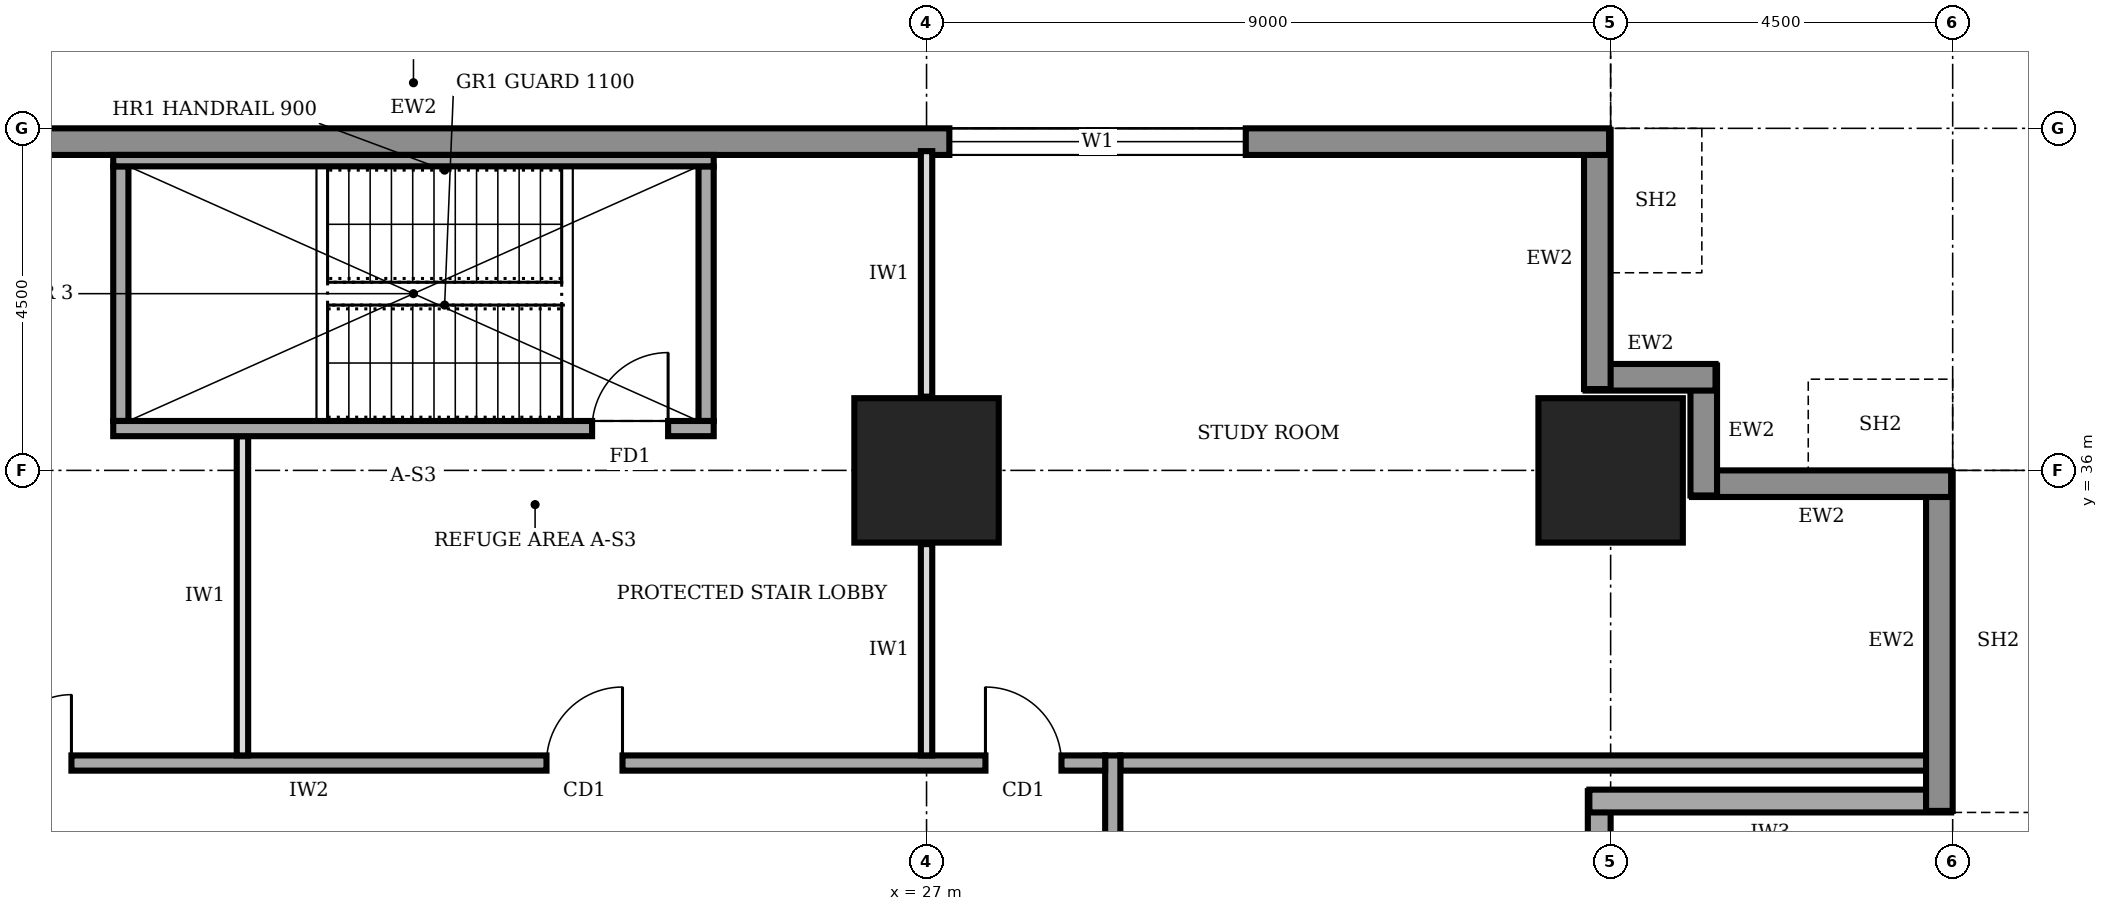
"""IFC4 building model, lengths in metres.
Left out: names, types, materials, properties, quantities, classifications, styles, units other than length and angle.
Written with IfcOpenShell. Run it as: python <this file> out.ifc"""

import sys

from ifc_helpers import new_model, si_unit, direction, frame, frame_2d, origin, origin_2d, place, context, subcontext, project, spatial, rectangle, extrude, element, fill, save


model = new_model("IFC4")
c1 = context("Model", 3, precision=1e-05, world=origin(), true_north=direction((0.0, 1.0)))
c2 = subcontext(c1, "Body", "Model", "MODEL_VIEW")
j1 = project(units=[si_unit("LENGTHUNIT", "METRE"), si_unit("PLANEANGLEUNIT", "RADIAN")], contexts=[c1])
p1 = place(None, origin())
s1 = spatial("IfcSite", under=j1, at=p1, CompositionType="ELEMENT")
p2 = place(p1, origin())
s2 = spatial("IfcBuilding", under=s1, at=p2, CompositionType="ELEMENT")
p3 = place(p2, frame((0.0, 0.0, 125.0)))
s3 = spatial("IfcBuildingStorey", under=s2, at=p3, CompositionType="ELEMENT", Elevation=125.0)
for number, where, z_axis, x_axis in (
    (1, (27.0, 36.0, 0.0), (0.0, 0.0, 1.0), (1.0, 0.0, 0.0)),
    (2, (36.0, 36.0, 0.0), (0.0, 0.0, 1.0), (1.0, 0.0, 0.0)),
):
    element("IfcColumn", number, at=place(p3, frame(where, z_axis=z_axis, x_axis=x_axis)), inside=s3, PredefinedType="COLUMN", context=c2, shape_type="SweptSolid", body=[
        extrude(rectangle(XDim=1.9, YDim=1.9, at=origin_2d()), origin(), (0.0, 0.0, 1.0), 4.0),
    ])
p4 = place(p3, frame((35.85, 30.4, 0.0), z_axis=(0.0, 0.0, 1.0), x_axis=(0.0, 1.0, 0.0)))
e3 = element("IfcWall", 3, at=p4, inside=s3, PredefinedType="SOLIDWALL", context=c2, shape_type="SweptSolid", body=[
    extrude(rectangle(XDim=1.38, YDim=0.3, at=frame_2d((0.69, 0.0))), origin(), (0.0, 0.0, 1.0), 2.65),
])
p5 = place(p3, frame((35.72, 31.65, 0.0), z_axis=(0.0, 0.0, 1.0), x_axis=(1.0, 0.0, 0.0)))
e4 = element("IfcWall", 4, at=p5, inside=s3, PredefinedType="SOLIDWALL", context=c2, shape_type="SweptSolid", body=[
    extrude(rectangle(XDim=4.76, YDim=0.3, at=frame_2d((2.38, 0.0))), origin(), (0.0, 0.0, 1.0), 3.75),
])
p6 = place(p3, frame((40.325, 31.52, 0.0), z_axis=(0.0, 0.0, 1.0), x_axis=(0.0, 1.0, 0.0)))
e5 = element("IfcWall", 5, at=p6, inside=s3, PredefinedType="STANDARD", context=c2, shape_type="SweptSolid", body=[
    extrude(rectangle(XDim=4.46, YDim=0.35, at=frame_2d((2.23, 0.0))), origin(), (0.0, 0.0, 1.0), 3.75),
])
p7 = place(p3, frame((40.48, 35.825, 0.0), z_axis=(0.0, 0.0, 1.0), x_axis=(-1.0, 0.0, 0.0)))
e6 = element("IfcWall", 6, at=p7, inside=s3, PredefinedType="STANDARD", context=c2, shape_type="SweptSolid", body=[
    extrude(rectangle(XDim=3.41, YDim=0.35, at=frame_2d((1.705, 0.0))), origin(), (0.0, 0.0, 1.0), 2.85),
])
for number, where, z_axis, x_axis in (
    (7, (37.225, 35.67, 0.0), (0.0, 0.0, 1.0), (0.0, 1.0, 0.0)),
    (8, (37.38, 37.225, 0.0), (0.0, 0.0, 1.0), (-1.0, 0.0, 0.0)),
):
    element("IfcWall", number, at=place(p3, frame(where, z_axis=z_axis, x_axis=x_axis)), inside=s3, PredefinedType="STANDARD", context=c2, shape_type="SweptSolid", body=[
        extrude(rectangle(XDim=1.71, YDim=0.35, at=frame_2d((0.855, 0.0))), origin(), (0.0, 0.0, 1.0), 3.75),
    ])
p8 = place(p3, frame((35.825, 37.07, 0.0), z_axis=(0.0, 0.0, 1.0), x_axis=(0.0, 1.0, 0.0)))
e9 = element("IfcWall", 9, at=p8, inside=s3, PredefinedType="STANDARD", context=c2, shape_type="SweptSolid", body=[
    extrude(rectangle(XDim=3.41, YDim=0.35, at=frame_2d((1.705, 0.0))), origin(), (0.0, 0.0, 1.0), 2.85),
])
p9 = place(p3, frame((35.98, 40.325, 0.0), z_axis=(0.0, 0.0, 1.0), x_axis=(-1.0, 0.0, 0.0)))
e10 = element("IfcWall", 10, at=p9, inside=s3, PredefinedType="STANDARD", context=c2, shape_type="SweptSolid", body=[
    extrude(rectangle(XDim=31.46, YDim=0.35, at=frame_2d((15.73, 0.0))), origin(), (0.0, 0.0, 1.0), 3.75),
])
p10 = place(p9, frame((27.21, 0.0, 0.9)))
e11 = element("IfcOpeningElement", 11, at=p10, cuts=e10, PredefinedType="OPENING", context=c2, shape_type="SweptSolid", body=[
    extrude(rectangle(XDim=3.9, YDim=2.2, at=frame_2d((1.95, 1.1))), frame((0.0, 0.185, 0.0), z_axis=(0.0, -1.0, 0.0), x_axis=(1.0, 0.0, 0.0)), (0.0, 0.0, 1.0), 0.37),
])
p11 = place(p9, frame((22.78, 0.0, 0.9)))
e12 = element("IfcOpeningElement", 12, at=p11, cuts=e10, PredefinedType="OPENING", context=c2, shape_type="SweptSolid", body=[
    extrude(rectangle(XDim=3.9, YDim=2.2, at=frame_2d((1.95, 1.1))), frame((0.0, 0.185, 0.0), z_axis=(0.0, -1.0, 0.0), x_axis=(1.0, 0.0, 0.0)), (0.0, 0.0, 1.0), 0.37),
])
p12 = place(p9, frame((4.78, 0.0, 0.9)))
e13 = element("IfcOpeningElement", 13, at=p12, cuts=e10, PredefinedType="OPENING", context=c2, shape_type="SweptSolid", body=[
    extrude(rectangle(XDim=3.9, YDim=2.2, at=frame_2d((1.95, 1.1))), frame((0.0, 0.185, 0.0), z_axis=(0.0, -1.0, 0.0), x_axis=(1.0, 0.0, 0.0)), (0.0, 0.0, 1.0), 0.37),
])
p13 = place(p3, frame((29.45, 9.2, 0.0), z_axis=(0.0, 0.0, 1.0), x_axis=(0.0, 1.0, 0.0)))
e14 = element("IfcWall", 14, at=p13, inside=s3, PredefinedType="SOLIDWALL", context=c2, shape_type="SweptSolid", body=[
    extrude(rectangle(XDim=23.05, YDim=0.2, at=frame_2d((11.525, 0.0))), origin(), (0.0, 0.0, 1.0), 3.75),
])
p14 = place(p13, frame((10.525, 0.0, 0.0)))
e15 = element("IfcOpeningElement", 15, at=p14, cuts=e14, PredefinedType="OPENING", context=c2, shape_type="SweptSolid", body=[
    extrude(rectangle(XDim=1.8, YDim=2.1, at=frame_2d((0.9, 1.05))), frame((0.0, 0.11, 0.0), z_axis=(0.0, -1.0, 0.0), x_axis=(1.0, 0.0, 0.0)), (0.0, 0.0, 1.0), 0.22),
])
p15 = place(p3, frame((29.35, 32.15, 0.0), z_axis=(0.0, 0.0, 1.0), x_axis=(-1.0, 0.0, 0.0)))
e16 = element("IfcWall", 16, at=p15, inside=s3, PredefinedType="SOLIDWALL", context=c2, shape_type="SweptSolid", body=[
    extrude(rectangle(XDim=17.65, YDim=0.2, at=frame_2d((8.825, 0.0))), origin(), (0.0, 0.0, 1.0), 3.75),
])
p16 = place(p15, frame((13.6, 0.0, 0.0)))
e17 = element("IfcOpeningElement", 17, at=p16, cuts=e16, PredefinedType="OPENING", context=c2, shape_type="SweptSolid", body=[
    extrude(rectangle(XDim=1.8, YDim=2.1, at=frame_2d((0.9, 1.05))), frame((0.0, 0.11, 0.0), z_axis=(0.0, -1.0, 0.0), x_axis=(1.0, 0.0, 0.0)), (0.0, 0.0, 1.0), 0.22),
])
p17 = place(p15, frame((6.35, 0.0, 0.0)))
e18 = element("IfcOpeningElement", 18, at=p17, cuts=e16, PredefinedType="OPENING", context=c2, shape_type="SweptSolid", body=[
    extrude(rectangle(XDim=1.0, YDim=2.1, at=frame_2d((0.5, 1.05))), frame((0.0, 0.11, 0.0), z_axis=(0.0, -1.0, 0.0), x_axis=(1.0, 0.0, 0.0)), (0.0, 0.0, 1.0), 0.22),
])
p18 = place(p15, frame((0.575, 0.0, 0.0)))
e19 = element("IfcOpeningElement", 19, at=p18, cuts=e16, PredefinedType="OPENING", context=c2, shape_type="SweptSolid", body=[
    extrude(rectangle(XDim=1.0, YDim=2.1, at=frame_2d((0.5, 1.05))), frame((0.0, 0.11, 0.0), z_axis=(0.0, -1.0, 0.0), x_axis=(1.0, 0.0, 0.0)), (0.0, 0.0, 1.0), 0.22),
])
p19 = place(p3, frame((29.55, 32.15, 0.0), z_axis=(0.0, 0.0, 1.0), x_axis=(1.0, 0.0, 0.0)))
e20 = element("IfcWall", 20, at=p19, inside=s3, PredefinedType="SOLIDWALL", context=c2, shape_type="SweptSolid", body=[
    extrude(rectangle(XDim=10.65, YDim=0.2, at=frame_2d((5.325, 0.0))), origin(), (0.0, 0.0, 1.0), 3.75),
])
p20 = place(p3, frame((18.0, 32.25, 0.0), z_axis=(0.0, 0.0, 1.0), x_axis=(0.0, 1.0, 0.0)))
e21 = element("IfcWall", 21, at=p20, inside=s3, PredefinedType="PARTITIONING", context=c2, shape_type="SweptSolid", body=[
    extrude(rectangle(XDim=4.2, YDim=0.15, at=frame_2d((2.1, 0.0))), origin(), (0.0, 0.0, 1.0), 3.75),
])
p21 = place(p3, frame((27.0, 32.25, 0.0), z_axis=(0.0, 0.0, 1.0), x_axis=(0.0, 1.0, 0.0)))
e22 = element("IfcWall", 22, at=p21, inside=s3, PredefinedType="PARTITIONING", context=c2, shape_type="SweptSolid", body=[
    extrude(rectangle(XDim=2.78, YDim=0.15, at=frame_2d((1.39, 0.0))), origin(), (0.0, 0.0, 1.0), 2.85),
])
p22 = place(p3, frame((27.0, 36.97, 0.0), z_axis=(0.0, 0.0, 1.0), x_axis=(0.0, 1.0, 0.0)))
e23 = element("IfcWall", 23, at=p22, inside=s3, PredefinedType="PARTITIONING", context=c2, shape_type="SweptSolid", body=[
    extrude(rectangle(XDim=3.23, YDim=0.15, at=frame_2d((1.615, 0.0))), origin(), (0.0, 0.0, 1.0), 2.85),
])
p23 = place(p3, frame((16.3, 36.55, 0.0), z_axis=(0.0, 0.0, 1.0), x_axis=(1.0, 0.0, 0.0)))
e24 = element("IfcWall", 24, at=p23, inside=s3, PredefinedType="SOLIDWALL", context=c2, shape_type="SweptSolid", body=[
    extrude(rectangle(XDim=7.9, YDim=0.2, at=frame_2d((3.95, 0.0))), origin(), (0.0, 0.0, 1.0), 3.75),
])
p24 = place(p23, frame((6.3, 0.0, 0.0)))
e25 = element("IfcOpeningElement", 25, at=p24, cuts=e24, PredefinedType="OPENING", context=c2, shape_type="SweptSolid", body=[
    extrude(rectangle(XDim=1.0, YDim=2.1, at=frame_2d((0.5, 1.05))), frame((0.0, 0.11, 0.0), z_axis=(0.0, -1.0, 0.0), x_axis=(1.0, 0.0, 0.0)), (0.0, 0.0, 1.0), 0.22),
])
p25 = place(p3, frame((16.3, 40.075, 0.0), z_axis=(0.0, 0.0, 1.0), x_axis=(1.0, 0.0, 0.0)))
e26 = element("IfcWall", 26, at=p25, inside=s3, PredefinedType="SOLIDWALL", context=c2, shape_type="SweptSolid", body=[
    extrude(rectangle(XDim=7.9, YDim=0.15, at=frame_2d((3.95, 0.0))), origin(), (0.0, 0.0, 1.0), 3.75),
])
for number, where, z_axis, x_axis in (
    (27, (16.4, 36.65, 0.0), (0.0, 0.0, 1.0), (0.0, 1.0, 0.0)),
    (28, (24.1, 36.65, 0.0), (0.0, 0.0, 1.0), (0.0, 1.0, 0.0)),
):
    element("IfcWall", number, at=place(p3, frame(where, z_axis=z_axis, x_axis=x_axis)), inside=s3, PredefinedType="SOLIDWALL", context=c2, shape_type="SweptSolid", body=[
        extrude(rectangle(XDim=3.35, YDim=0.2, at=frame_2d((1.675, 0.0))), origin(), (0.0, 0.0, 1.0), 3.75),
    ])
p26 = place(p12, origin())
e29 = element("IfcWindow", 29, at=p26, inside=s3, PartitioningType="SINGLE_PANEL", PredefinedType="WINDOW", context=c2, shape_type="SweptSolid", body=[
    extrude(rectangle(XDim=3.9, YDim=2.2, at=frame_2d((1.95, 1.1))), frame((0.0, 0.03, 0.0), z_axis=(0.0, -1.0, 0.0), x_axis=(1.0, 0.0, 0.0)), (0.0, 0.0, 1.0), 0.06),
])
fill(e13, e29)
p27 = place(p16, frame((1.8, 0.0, 0.0), z_axis=(0.0, 0.0, 1.0), x_axis=(-1.0, 0.0, 0.0)))
e30 = element("IfcDoor", 30, at=p27, inside=s3, OperationType="DOUBLE_DOOR_SINGLE_SWING", PredefinedType="DOOR", context=c2, shape_type="SweptSolid", body=[
    extrude(rectangle(XDim=1.8, YDim=2.1, at=frame_2d((0.9, 1.05))), frame((0.0, 0.025, 0.0), z_axis=(0.0, -1.0, 0.0), x_axis=(1.0, 0.0, 0.0)), (0.0, 0.0, 1.0), 0.05),
])
fill(e17, e30)
p28 = place(p17, frame((1.0, 0.0, 0.0), z_axis=(0.0, 0.0, 1.0), x_axis=(-1.0, 0.0, 0.0)))
e31 = element("IfcDoor", 31, at=p28, inside=s3, OperationType="SINGLE_SWING_RIGHT", PredefinedType="DOOR", context=c2, shape_type="SweptSolid", body=[
    extrude(rectangle(XDim=1.0, YDim=2.1, at=frame_2d((0.5, 1.05))), frame((0.0, 0.025, 0.0), z_axis=(0.0, -1.0, 0.0), x_axis=(1.0, 0.0, 0.0)), (0.0, 0.0, 1.0), 0.05),
])
fill(e18, e31)
p29 = place(p18, frame((1.0, 0.0, 0.0), z_axis=(0.0, 0.0, 1.0), x_axis=(-1.0, 0.0, 0.0)))
e32 = element("IfcDoor", 32, at=p29, inside=s3, OperationType="SINGLE_SWING_LEFT", PredefinedType="DOOR", context=c2, shape_type="SweptSolid", body=[
    extrude(rectangle(XDim=1.0, YDim=2.1, at=frame_2d((0.5, 1.05))), frame((0.0, 0.025, 0.0), z_axis=(0.0, -1.0, 0.0), x_axis=(1.0, 0.0, 0.0)), (0.0, 0.0, 1.0), 0.05),
])
fill(e19, e32)
p30 = place(p24, origin())
e33 = element("IfcDoor", 33, at=p30, inside=s3, OperationType="SINGLE_SWING_RIGHT", PredefinedType="DOOR", context=c2, shape_type="SweptSolid", body=[
    extrude(rectangle(XDim=1.0, YDim=2.1, at=frame_2d((0.5, 1.05))), frame((0.0, 0.025, 0.0), z_axis=(0.0, -1.0, 0.0), x_axis=(1.0, 0.0, 0.0)), (0.0, 0.0, 1.0), 0.05),
])
fill(e25, e33)
save(model, sys.argv[1])
